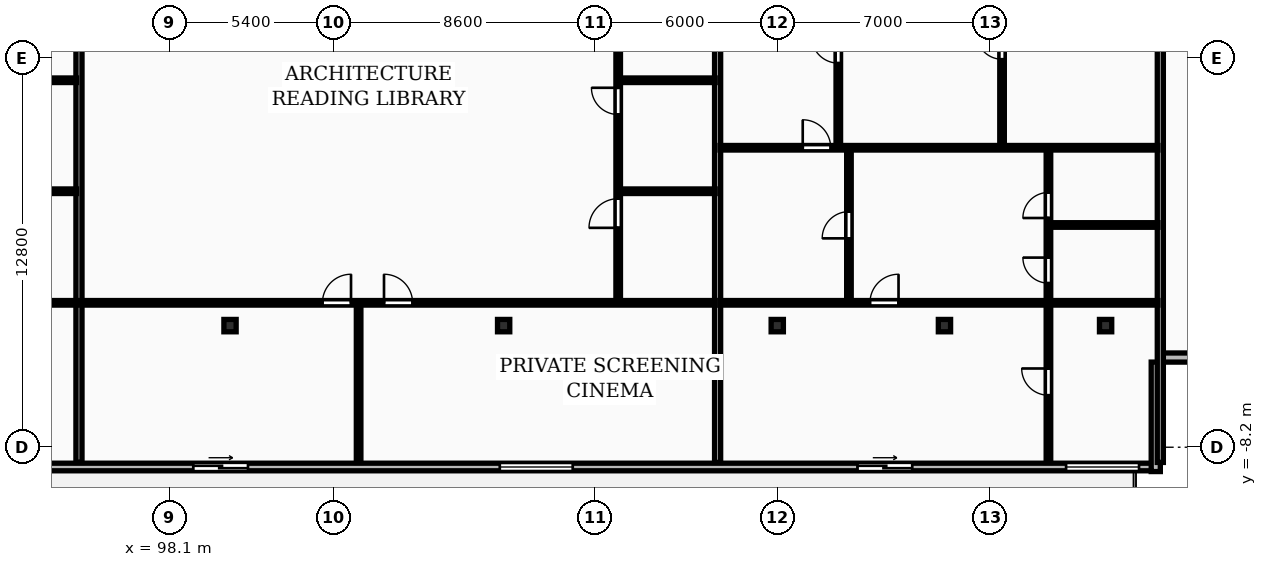
"""IFC4 building model, lengths in metres.
Left out: names, types, materials, properties, quantities, classifications, styles, units other than length and angle.
Written with IfcOpenShell. Run it as: python <this file> out.ifc"""

import sys

from ifc_helpers import new_model, si_unit, direction, frame, frame_2d, origin, origin_2d, place, context, subcontext, project, spatial, rectangle, i_section, extrude, element, fill, save


model = new_model("IFC4")
c1 = context("Model", 3, precision=1e-05, world=origin(), true_north=direction((0.0, 1.0)))
c2 = subcontext(c1, "Body", "Model", "MODEL_VIEW")
j1 = project(units=[si_unit("LENGTHUNIT", "METRE"), si_unit("PLANEANGLEUNIT", "RADIAN")], contexts=[c1])
p1 = place(None, origin())
s1 = spatial("IfcSite", under=j1, at=p1, CompositionType="ELEMENT")
p2 = place(p1, origin())
s2 = spatial("IfcBuilding", under=s1, at=p2, CompositionType="ELEMENT")
p3 = place(p2, frame((0.0, 0.0, 153.7)))
s3 = spatial("IfcBuildingStorey", under=s2, at=p3, CompositionType="ELEMENT", Elevation=153.7)
for number, where, z_axis, x_axis in (
    (1, (100.1, -4.2, 0.0), (0.0, 0.0, 1.0), (1.0, 0.0, 0.0)),
    (2, (109.1, -4.2, 0.0), (0.0, 0.0, 1.0), (1.0, 0.0, 0.0)),
    (3, (118.1, -4.2, 0.0), (0.0, 0.0, 1.0), (1.0, 0.0, 0.0)),
    (4, (123.6, -4.2, 0.0), (0.0, 0.0, 1.0), (1.0, 0.0, 0.0)),
    (5, (128.9, -4.2, 0.0), (0.0, 0.0, 1.0), (1.0, 0.0, 0.0)),
):
    element("IfcColumn", number, at=place(p3, frame(where, z_axis=z_axis, x_axis=x_axis)), inside=s3, PredefinedType="COLUMN", context=c2, shape_type="SweptSolid", body=[
        extrude(i_section(OverallWidth=0.403, OverallDepth=0.406, WebThickness=0.027, FlangeThickness=0.043, FilletRadius=0.015, at=origin_2d()), origin(), (0.0, 0.0, 1.0), 3.6),
    ])
p4 = place(p3, frame((72.7, -8.85, 0.0), z_axis=(0.0, 0.0, 1.0), x_axis=(1.0, 0.0, 0.0)))
e6 = element("IfcWall", 6, at=p4, inside=s3, PredefinedType="STANDARD", context=c2, shape_type="SweptSolid", body=[
    extrude(rectangle(XDim=58.0, YDim=0.25, at=frame_2d((29.0, 0.0))), origin(), (0.0, 0.0, 1.0), 3.32),
])
p5 = place(p4, frame((4.058, 0.0, 0.0)))
e7 = element("IfcOpeningElement", 7, at=p5, cuts=e6, PredefinedType="OPENING", context=c2, shape_type="SweptSolid", body=[
    extrude(rectangle(XDim=1.8, YDim=2.2, at=frame_2d((0.9, 1.1))), frame((0.0, 0.135, 0.0), z_axis=(0.0, -1.0, 0.0), x_axis=(1.0, 0.0, 0.0)), (0.0, 0.0, 1.0), 0.27),
])
p6 = place(p4, frame((14.854, 0.0, 0.85)))
e8 = element("IfcOpeningElement", 8, at=p6, cuts=e6, PredefinedType="OPENING", context=c2, shape_type="SweptSolid", body=[
    extrude(rectangle(XDim=2.4, YDim=1.9, at=frame_2d((1.2, 0.95))), frame((0.0, 0.135, 0.0), z_axis=(0.0, -1.0, 0.0), x_axis=(1.0, 0.0, 0.0)), (0.0, 0.0, 1.0), 0.27),
])
p7 = place(p4, frame((26.191, 0.0, 0.0)))
e9 = element("IfcOpeningElement", 9, at=p7, cuts=e6, PredefinedType="OPENING", context=c2, shape_type="SweptSolid", body=[
    extrude(rectangle(XDim=1.8, YDim=2.2, at=frame_2d((0.9, 1.1))), frame((0.0, 0.135, 0.0), z_axis=(0.0, -1.0, 0.0), x_axis=(1.0, 0.0, 0.0)), (0.0, 0.0, 1.0), 0.27),
])
p8 = place(p4, frame((36.274, 0.0, 0.85)))
e10 = element("IfcOpeningElement", 10, at=p8, cuts=e6, PredefinedType="OPENING", context=c2, shape_type="SweptSolid", body=[
    extrude(rectangle(XDim=2.4, YDim=1.9, at=frame_2d((1.2, 0.95))), frame((0.0, 0.135, 0.0), z_axis=(0.0, -1.0, 0.0), x_axis=(1.0, 0.0, 0.0)), (0.0, 0.0, 1.0), 0.27),
])
p9 = place(p4, frame((48.039, 0.0, 0.0)))
e11 = element("IfcOpeningElement", 11, at=p9, cuts=e6, PredefinedType="OPENING", context=c2, shape_type="SweptSolid", body=[
    extrude(rectangle(XDim=1.8, YDim=2.2, at=frame_2d((0.9, 1.1))), frame((0.0, 0.135, 0.0), z_axis=(0.0, -1.0, 0.0), x_axis=(1.0, 0.0, 0.0)), (0.0, 0.0, 1.0), 0.27),
])
p10 = place(p4, frame((54.9, 0.0, 0.85)))
e12 = element("IfcOpeningElement", 12, at=p10, cuts=e6, PredefinedType="OPENING", context=c2, shape_type="SweptSolid", body=[
    extrude(rectangle(XDim=2.4, YDim=1.9, at=frame_2d((1.2, 0.95))), frame((0.0, 0.135, 0.0), z_axis=(0.0, -1.0, 0.0), x_axis=(1.0, 0.0, 0.0)), (0.0, 0.0, 1.0), 0.27),
])
for number, where, z_axis, x_axis in (
    (13, (130.55, -9.0, 0.0), (0.0, 0.0, 1.0), (0.0, 1.0, 0.0)),
    (14, (130.7, -5.25, 0.0), (0.0, 0.0, 1.0), (1.0, 0.0, 0.0)),
):
    element("IfcWall", number, at=place(p3, frame(where, z_axis=z_axis, x_axis=x_axis)), inside=s3, PredefinedType="STANDARD", context=c2, shape_type="SweptSolid", body=[
        extrude(rectangle(XDim=3.6, YDim=0.3, at=frame_2d((1.8, 0.0))), origin(), (0.0, 0.0, 1.0), 3.32),
    ])
for number, where, z_axis, x_axis in (
    (15, (130.7, -8.7, 0.0), (0.0, 0.0, 1.0), (0.0, 1.0, 0.0)),
    (16, (95.132, -8.7, 0.0), (0.0, 0.0, 1.0), (0.0, 1.0, 0.0)),
):
    element("IfcWall", number, at=place(p3, frame(where, z_axis=z_axis, x_axis=x_axis)), inside=s3, PredefinedType="PARTITIONING", context=c2, shape_type="SweptSolid", body=[
        extrude(rectangle(XDim=24.57, YDim=0.2, at=frame_2d((12.285, 0.0))), origin(), (0.0, 0.0, 1.0), 3.32),
    ])
for number, where, z_axis, x_axis in (
    (17, (91.691, 0.22, 0.0), (0.0, 0.0, 1.0), (1.0, 0.0, 0.0)),
    (18, (91.691, 3.87, 0.0), (0.0, 0.0, 1.0), (1.0, 0.0, 0.0)),
):
    element("IfcWall", number, at=place(p3, frame(where, z_axis=z_axis, x_axis=x_axis)), inside=s3, PredefinedType="PARTITIONING", context=c2, shape_type="SweptSolid", body=[
        extrude(rectangle(XDim=3.36, YDim=0.15, at=frame_2d((1.68, 0.0))), origin(), (0.0, 0.0, 1.0), 3.32),
    ])
p11 = place(p3, frame((72.78, -3.45, 0.0), z_axis=(0.0, 0.0, 1.0), x_axis=(1.0, 0.0, 0.0)))
e19 = element("IfcWall", 19, at=p11, inside=s3, PredefinedType="PARTITIONING", context=c2, shape_type="SweptSolid", body=[
    extrude(rectangle(XDim=22.271, YDim=0.15, at=frame_2d((11.136, 0.0))), origin(), (0.0, 0.0, 1.0), 3.32),
])
p12 = place(p11, frame((6.871, 0.0, 0.0)))
e20 = element("IfcOpeningElement", 20, at=p12, cuts=e19, PredefinedType="OPENING", context=c2, shape_type="SweptSolid", body=[
    extrude(rectangle(XDim=0.94, YDim=2.1, at=frame_2d((0.47, 1.05))), frame((0.0, 0.085, 0.0), z_axis=(0.0, -1.0, 0.0), x_axis=(1.0, 0.0, 0.0)), (0.0, 0.0, 1.0), 0.17),
])
p13 = place(p11, frame((10.735, 0.0, 0.0)))
e21 = element("IfcOpeningElement", 21, at=p13, cuts=e19, PredefinedType="OPENING", context=c2, shape_type="SweptSolid", body=[
    extrude(rectangle(XDim=0.94, YDim=2.1, at=frame_2d((0.47, 1.05))), frame((0.0, 0.085, 0.0), z_axis=(0.0, -1.0, 0.0), x_axis=(1.0, 0.0, 0.0)), (0.0, 0.0, 1.0), 0.17),
])
p14 = place(p3, frame((116.138, -8.7, 0.0), z_axis=(0.0, 0.0, 1.0), x_axis=(0.0, 1.0, 0.0)))
e22 = element("IfcWall", 22, at=p14, inside=s3, PredefinedType="PARTITIONING", context=c2, shape_type="SweptSolid", body=[
    extrude(rectangle(XDim=24.57, YDim=0.2, at=frame_2d((12.285, 0.0))), origin(), (0.0, 0.0, 1.0), 3.32),
])
for number, where, z_axis, x_axis in (
    (23, (112.928, 0.22, 0.0), (0.0, 0.0, 1.0), (1.0, 0.0, 0.0)),
    (24, (112.928, 3.87, 0.0), (0.0, 0.0, 1.0), (1.0, 0.0, 0.0)),
):
    element("IfcWall", number, at=place(p3, frame(where, z_axis=z_axis, x_axis=x_axis)), inside=s3, PredefinedType="PARTITIONING", context=c2, shape_type="SweptSolid", body=[
        extrude(rectangle(XDim=3.13, YDim=0.15, at=frame_2d((1.565, 0.0))), origin(), (0.0, 0.0, 1.0), 3.32),
    ])
p15 = place(p3, frame((112.868, -3.39, 0.0), z_axis=(0.0, 0.0, 1.0), x_axis=(0.0, 1.0, 0.0)))
e25 = element("IfcWall", 25, at=p15, inside=s3, PredefinedType="PARTITIONING", context=c2, shape_type="SweptSolid", body=[
    extrude(rectangle(XDim=19.28, YDim=0.15, at=frame_2d((9.64, 0.0))), origin(), (0.0, 0.0, 1.0), 3.32),
])
p16 = place(p15, frame((2.406, 0.0, 0.0)))
e26 = element("IfcOpeningElement", 26, at=p16, cuts=e25, PredefinedType="OPENING", context=c2, shape_type="SweptSolid", body=[
    extrude(rectangle(XDim=0.96, YDim=2.1, at=frame_2d((0.48, 1.05))), frame((0.0, 0.085, 0.0), z_axis=(0.0, -1.0, 0.0), x_axis=(1.0, 0.0, 0.0)), (0.0, 0.0, 1.0), 0.17),
])
p17 = place(p15, frame((6.133, 0.0, 0.0)))
e27 = element("IfcOpeningElement", 27, at=p17, cuts=e25, PredefinedType="OPENING", context=c2, shape_type="SweptSolid", body=[
    extrude(rectangle(XDim=0.88, YDim=2.06, at=frame_2d((0.44, 1.03))), frame((0.0, 0.085, 0.0), z_axis=(0.0, -1.0, 0.0), x_axis=(1.0, 0.0, 0.0)), (0.0, 0.0, 1.0), 0.17),
])
p18 = place(p15, frame((9.22, 0.0, 0.0)))
e28 = element("IfcOpeningElement", 28, at=p18, cuts=e25, PredefinedType="OPENING", context=c2, shape_type="SweptSolid", body=[
    extrude(rectangle(XDim=0.84, YDim=2.04, at=frame_2d((0.42, 1.02))), frame((0.0, 0.085, 0.0), z_axis=(0.0, -1.0, 0.0), x_axis=(1.0, 0.0, 0.0)), (0.0, 0.0, 1.0), 0.17),
])
p19 = place(p3, frame((104.33, -8.7, 0.0), z_axis=(0.0, 0.0, 1.0), x_axis=(0.0, 1.0, 0.0)))
e29 = element("IfcWall", 29, at=p19, inside=s3, PredefinedType="PARTITIONING", context=c2, shape_type="SweptSolid", body=[
    extrude(rectangle(XDim=5.17, YDim=0.15, at=frame_2d((2.585, 0.0))), origin(), (0.0, 0.0, 1.0), 3.32),
])
p20 = place(p3, frame((95.211, -3.45, 0.0), z_axis=(0.0, 0.0, 1.0), x_axis=(1.0, 0.0, 0.0)))
e30 = element("IfcWall", 30, at=p20, inside=s3, PredefinedType="PARTITIONING", context=c2, shape_type="SweptSolid", body=[
    extrude(rectangle(XDim=20.847, YDim=0.15, at=frame_2d((10.423, 0.0))), origin(), (0.0, 0.0, 1.0), 3.32),
])
p21 = place(p20, frame((7.928, 0.0, 0.0)))
e31 = element("IfcOpeningElement", 31, at=p21, cuts=e30, PredefinedType="OPENING", context=c2, shape_type="SweptSolid", body=[
    extrude(rectangle(XDim=0.94, YDim=2.1, at=frame_2d((0.47, 1.05))), frame((0.0, 0.085, 0.0), z_axis=(0.0, -1.0, 0.0), x_axis=(1.0, 0.0, 0.0)), (0.0, 0.0, 1.0), 0.17),
])
p22 = place(p20, frame((9.953, 0.0, 0.0)))
e32 = element("IfcOpeningElement", 32, at=p22, cuts=e30, PredefinedType="OPENING", context=c2, shape_type="SweptSolid", body=[
    extrude(rectangle(XDim=0.94, YDim=2.1, at=frame_2d((0.47, 1.05))), frame((0.0, 0.085, 0.0), z_axis=(0.0, -1.0, 0.0), x_axis=(1.0, 0.0, 0.0)), (0.0, 0.0, 1.0), 0.17),
])
p23 = place(p3, frame((125.494, 1.69, 0.0), z_axis=(0.0, 0.0, 1.0), x_axis=(0.0, 1.0, 0.0)))
e33 = element("IfcWall", 33, at=p23, inside=s3, PredefinedType="PARTITIONING", context=c2, shape_type="SweptSolid", body=[
    extrude(rectangle(XDim=6.92, YDim=0.15, at=frame_2d((3.46, 0.0))), origin(), (0.0, 0.0, 1.0), 3.32),
])
p24 = place(p23, frame((2.871, 0.0, 0.0)))
e34 = element("IfcOpeningElement", 34, at=p24, cuts=e33, PredefinedType="OPENING", context=c2, shape_type="SweptSolid", body=[
    extrude(rectangle(XDim=0.84, YDim=2.04, at=frame_2d((0.42, 1.02))), frame((0.0, 0.085, 0.0), z_axis=(0.0, -1.0, 0.0), x_axis=(1.0, 0.0, 0.0)), (0.0, 0.0, 1.0), 0.17),
])
p25 = place(p3, frame((120.108, 1.69, 0.0), z_axis=(0.0, 0.0, 1.0), x_axis=(0.0, 1.0, 0.0)))
e35 = element("IfcWall", 35, at=p25, inside=s3, PredefinedType="PARTITIONING", context=c2, shape_type="SweptSolid", body=[
    extrude(rectangle(XDim=14.2, YDim=0.15, at=frame_2d((7.1, 0.0))), origin(), (0.0, 0.0, 1.0), 3.32),
])
p26 = place(p25, frame((2.744, 0.0, 0.0)))
e36 = element("IfcOpeningElement", 36, at=p26, cuts=e35, PredefinedType="OPENING", context=c2, shape_type="SweptSolid", body=[
    extrude(rectangle(XDim=0.88, YDim=2.06, at=frame_2d((0.44, 1.03))), frame((0.0, 0.085, 0.0), z_axis=(0.0, -1.0, 0.0), x_axis=(1.0, 0.0, 0.0)), (0.0, 0.0, 1.0), 0.17),
])
p27 = place(p3, frame((120.458, -3.39, 0.0), z_axis=(0.0, 0.0, 1.0), x_axis=(0.0, 1.0, 0.0)))
e37 = element("IfcWall", 37, at=p27, inside=s3, PredefinedType="PARTITIONING", context=c2, shape_type="SweptSolid", body=[
    extrude(rectangle(XDim=5.0, YDim=0.15, at=frame_2d((2.5, 0.0))), origin(), (0.0, 0.0, 1.0), 3.32),
])
p28 = place(p27, frame((2.06, 0.0, 0.0)))
e38 = element("IfcOpeningElement", 38, at=p28, cuts=e37, PredefinedType="OPENING", context=c2, shape_type="SweptSolid", body=[
    extrude(rectangle(XDim=0.88, YDim=2.06, at=frame_2d((0.44, 1.03))), frame((0.0, 0.085, 0.0), z_axis=(0.0, -1.0, 0.0), x_axis=(1.0, 0.0, 0.0)), (0.0, 0.0, 1.0), 0.17),
])
p29 = place(p3, frame((127.08, -0.89, 0.0), z_axis=(0.0, 0.0, 1.0), x_axis=(1.0, 0.0, 0.0)))
e39 = element("IfcWall", 39, at=p29, inside=s3, PredefinedType="PARTITIONING", context=c2, shape_type="SweptSolid", body=[
    extrude(rectangle(XDim=3.54, YDim=0.15, at=frame_2d((1.77, 0.0))), origin(), (0.0, 0.0, 1.0), 3.32),
])
p30 = place(p3, frame((127.02, -8.7, 0.0), z_axis=(0.0, 0.0, 1.0), x_axis=(0.0, 1.0, 0.0)))
e40 = element("IfcWall", 40, at=p30, inside=s3, PredefinedType="PARTITIONING", context=c2, shape_type="SweptSolid", body=[
    extrude(rectangle(XDim=10.31, YDim=0.15, at=frame_2d((5.155, 0.0))), origin(), (0.0, 0.0, 1.0), 3.32),
])
p31 = place(p30, frame((5.897, 0.0, 0.0)))
e41 = element("IfcOpeningElement", 41, at=p31, cuts=e40, PredefinedType="OPENING", context=c2, shape_type="SweptSolid", body=[
    extrude(rectangle(XDim=0.84, YDim=2.04, at=frame_2d((0.42, 1.02))), frame((0.0, 0.085, 0.0), z_axis=(0.0, -1.0, 0.0), x_axis=(1.0, 0.0, 0.0)), (0.0, 0.0, 1.0), 0.17),
])
p32 = place(p30, frame((8.04, 0.0, 0.0)))
e42 = element("IfcOpeningElement", 42, at=p32, cuts=e40, PredefinedType="OPENING", context=c2, shape_type="SweptSolid", body=[
    extrude(rectangle(XDim=0.84, YDim=2.04, at=frame_2d((0.42, 1.02))), frame((0.0, 0.085, 0.0), z_axis=(0.0, -1.0, 0.0), x_axis=(1.0, 0.0, 0.0)), (0.0, 0.0, 1.0), 0.17),
])
p33 = place(p30, frame((2.21, 0.0, 0.0)))
e43 = element("IfcOpeningElement", 43, at=p33, cuts=e40, PredefinedType="OPENING", context=c2, shape_type="SweptSolid", body=[
    extrude(rectangle(XDim=0.88, YDim=2.06, at=frame_2d((0.44, 1.03))), frame((0.0, 0.085, 0.0), z_axis=(0.0, -1.0, 0.0), x_axis=(1.0, 0.0, 0.0)), (0.0, 0.0, 1.0), 0.17),
])
p34 = place(p3, frame((116.218, 1.65, 0.0), z_axis=(0.0, 0.0, 1.0), x_axis=(1.0, 0.0, 0.0)))
e44 = element("IfcWall", 44, at=p34, inside=s3, PredefinedType="PARTITIONING", context=c2, shape_type="SweptSolid", body=[
    extrude(rectangle(XDim=14.402, YDim=0.15, at=frame_2d((7.201, 0.0))), origin(), (0.0, 0.0, 1.0), 3.32),
])
p35 = place(p34, frame((2.72, 0.0, 0.0)))
e45 = element("IfcOpeningElement", 45, at=p35, cuts=e44, PredefinedType="OPENING", context=c2, shape_type="SweptSolid", body=[
    extrude(rectangle(XDim=0.92, YDim=2.08, at=frame_2d((0.46, 1.04))), frame((0.0, 0.085, 0.0), z_axis=(0.0, -1.0, 0.0), x_axis=(1.0, 0.0, 0.0)), (0.0, 0.0, 1.0), 0.17),
])
p36 = place(p3, frame((116.218, -3.45, 0.0), z_axis=(0.0, 0.0, 1.0), x_axis=(1.0, 0.0, 0.0)))
e46 = element("IfcWall", 46, at=p36, inside=s3, PredefinedType="PARTITIONING", context=c2, shape_type="SweptSolid", body=[
    extrude(rectangle(XDim=14.402, YDim=0.15, at=frame_2d((7.201, 0.0))), origin(), (0.0, 0.0, 1.0), 3.32),
])
p37 = place(p36, frame((4.931, 0.0, 0.0)))
e47 = element("IfcOpeningElement", 47, at=p37, cuts=e46, PredefinedType="OPENING", context=c2, shape_type="SweptSolid", body=[
    extrude(rectangle(XDim=0.94, YDim=2.1, at=frame_2d((0.47, 1.05))), frame((0.0, 0.085, 0.0), z_axis=(0.0, -1.0, 0.0), x_axis=(1.0, 0.0, 0.0)), (0.0, 0.0, 1.0), 0.17),
])
p38 = place(p7, origin())
e48 = element("IfcDoor", 48, at=p38, inside=s3, OperationType="SLIDING_TO_RIGHT", PredefinedType="DOOR", context=c2, shape_type="SweptSolid", body=[
    extrude(rectangle(XDim=1.8, YDim=2.2, at=frame_2d((0.9, 1.1))), frame((0.0, 0.025, 0.0), z_axis=(0.0, -1.0, 0.0), x_axis=(1.0, 0.0, 0.0)), (0.0, 0.0, 1.0), 0.05),
])
fill(e9, e48)
p39 = place(p8, origin())
e49 = element("IfcWindow", 49, at=p39, inside=s3, PartitioningType="DOUBLE_PANEL_VERTICAL", PredefinedType="WINDOW", context=c2, shape_type="SweptSolid", body=[
    extrude(rectangle(XDim=2.4, YDim=1.9, at=frame_2d((1.2, 0.95))), frame((0.0, 0.03, 0.0), z_axis=(0.0, -1.0, 0.0), x_axis=(1.0, 0.0, 0.0)), (0.0, 0.0, 1.0), 0.06),
])
fill(e10, e49)
p40 = place(p9, origin())
e50 = element("IfcDoor", 50, at=p40, inside=s3, OperationType="SLIDING_TO_RIGHT", PredefinedType="DOOR", context=c2, shape_type="SweptSolid", body=[
    extrude(rectangle(XDim=1.8, YDim=2.2, at=frame_2d((0.9, 1.1))), frame((0.0, 0.025, 0.0), z_axis=(0.0, -1.0, 0.0), x_axis=(1.0, 0.0, 0.0)), (0.0, 0.0, 1.0), 0.05),
])
fill(e11, e50)
p41 = place(p10, origin())
e51 = element("IfcWindow", 51, at=p41, inside=s3, PartitioningType="DOUBLE_PANEL_VERTICAL", PredefinedType="WINDOW", context=c2, shape_type="SweptSolid", body=[
    extrude(rectangle(XDim=2.4, YDim=1.9, at=frame_2d((1.2, 0.95))), frame((0.0, 0.03, 0.0), z_axis=(0.0, -1.0, 0.0), x_axis=(1.0, 0.0, 0.0)), (0.0, 0.0, 1.0), 0.06),
])
fill(e12, e51)
p42 = place(p16, origin())
e52 = element("IfcDoor", 52, at=p42, inside=s3, OperationType="SINGLE_SWING_LEFT", PredefinedType="DOOR", context=c2, shape_type="SweptSolid", body=[
    extrude(rectangle(XDim=0.96, YDim=2.1, at=frame_2d((0.48, 1.05))), frame((0.0, 0.025, 0.0), z_axis=(0.0, -1.0, 0.0), x_axis=(1.0, 0.0, 0.0)), (0.0, 0.0, 1.0), 0.05),
])
fill(e26, e52)
p43 = place(p17, origin())
e53 = element("IfcDoor", 53, at=p43, inside=s3, OperationType="SINGLE_SWING_RIGHT", PredefinedType="DOOR", context=c2, shape_type="SweptSolid", body=[
    extrude(rectangle(XDim=0.88, YDim=2.06, at=frame_2d((0.44, 1.03))), frame((0.0, 0.025, 0.0), z_axis=(0.0, -1.0, 0.0), x_axis=(1.0, 0.0, 0.0)), (0.0, 0.0, 1.0), 0.05),
])
fill(e27, e53)
p44 = place(p21, origin())
e54 = element("IfcDoor", 54, at=p44, inside=s3, OperationType="SINGLE_SWING_RIGHT", PredefinedType="DOOR", context=c2, shape_type="SweptSolid", body=[
    extrude(rectangle(XDim=0.94, YDim=2.1, at=frame_2d((0.47, 1.05))), frame((0.0, 0.025, 0.0), z_axis=(0.0, -1.0, 0.0), x_axis=(1.0, 0.0, 0.0)), (0.0, 0.0, 1.0), 0.05),
])
fill(e31, e54)
p45 = place(p22, origin())
e55 = element("IfcDoor", 55, at=p45, inside=s3, OperationType="SINGLE_SWING_LEFT", PredefinedType="DOOR", context=c2, shape_type="SweptSolid", body=[
    extrude(rectangle(XDim=0.94, YDim=2.1, at=frame_2d((0.47, 1.05))), frame((0.0, 0.025, 0.0), z_axis=(0.0, -1.0, 0.0), x_axis=(1.0, 0.0, 0.0)), (0.0, 0.0, 1.0), 0.05),
])
fill(e32, e55)
p46 = place(p24, origin())
e56 = element("IfcDoor", 56, at=p46, inside=s3, OperationType="SINGLE_SWING_RIGHT", PredefinedType="DOOR", context=c2, shape_type="SweptSolid", body=[
    extrude(rectangle(XDim=0.84, YDim=2.04, at=frame_2d((0.42, 1.02))), frame((0.0, 0.025, 0.0), z_axis=(0.0, -1.0, 0.0), x_axis=(1.0, 0.0, 0.0)), (0.0, 0.0, 1.0), 0.05),
])
fill(e34, e56)
p47 = place(p26, origin())
e57 = element("IfcDoor", 57, at=p47, inside=s3, OperationType="SINGLE_SWING_RIGHT", PredefinedType="DOOR", context=c2, shape_type="SweptSolid", body=[
    extrude(rectangle(XDim=0.88, YDim=2.06, at=frame_2d((0.44, 1.03))), frame((0.0, 0.025, 0.0), z_axis=(0.0, -1.0, 0.0), x_axis=(1.0, 0.0, 0.0)), (0.0, 0.0, 1.0), 0.05),
])
fill(e36, e57)
p48 = place(p28, origin())
e58 = element("IfcDoor", 58, at=p48, inside=s3, OperationType="SINGLE_SWING_LEFT", PredefinedType="DOOR", context=c2, shape_type="SweptSolid", body=[
    extrude(rectangle(XDim=0.88, YDim=2.06, at=frame_2d((0.44, 1.03))), frame((0.0, 0.025, 0.0), z_axis=(0.0, -1.0, 0.0), x_axis=(1.0, 0.0, 0.0)), (0.0, 0.0, 1.0), 0.05),
])
fill(e38, e58)
p49 = place(p31, origin())
e59 = element("IfcDoor", 59, at=p49, inside=s3, OperationType="SINGLE_SWING_RIGHT", PredefinedType="DOOR", context=c2, shape_type="SweptSolid", body=[
    extrude(rectangle(XDim=0.84, YDim=2.04, at=frame_2d((0.42, 1.02))), frame((0.0, 0.025, 0.0), z_axis=(0.0, -1.0, 0.0), x_axis=(1.0, 0.0, 0.0)), (0.0, 0.0, 1.0), 0.05),
])
fill(e41, e59)
p50 = place(p32, origin())
e60 = element("IfcDoor", 60, at=p50, inside=s3, OperationType="SINGLE_SWING_LEFT", PredefinedType="DOOR", context=c2, shape_type="SweptSolid", body=[
    extrude(rectangle(XDim=0.84, YDim=2.04, at=frame_2d((0.42, 1.02))), frame((0.0, 0.025, 0.0), z_axis=(0.0, -1.0, 0.0), x_axis=(1.0, 0.0, 0.0)), (0.0, 0.0, 1.0), 0.05),
])
fill(e42, e60)
p51 = place(p33, origin())
e61 = element("IfcDoor", 61, at=p51, inside=s3, OperationType="SINGLE_SWING_RIGHT", PredefinedType="DOOR", context=c2, shape_type="SweptSolid", body=[
    extrude(rectangle(XDim=0.88, YDim=2.06, at=frame_2d((0.44, 1.03))), frame((0.0, 0.025, 0.0), z_axis=(0.0, -1.0, 0.0), x_axis=(1.0, 0.0, 0.0)), (0.0, 0.0, 1.0), 0.05),
])
fill(e43, e61)
p52 = place(p35, origin())
e62 = element("IfcDoor", 62, at=p52, inside=s3, OperationType="SINGLE_SWING_LEFT", PredefinedType="DOOR", context=c2, shape_type="SweptSolid", body=[
    extrude(rectangle(XDim=0.92, YDim=2.08, at=frame_2d((0.46, 1.04))), frame((0.0, 0.025, 0.0), z_axis=(0.0, -1.0, 0.0), x_axis=(1.0, 0.0, 0.0)), (0.0, 0.0, 1.0), 0.05),
])
fill(e45, e62)
p53 = place(p37, origin())
e63 = element("IfcDoor", 63, at=p53, inside=s3, OperationType="SINGLE_SWING_RIGHT", PredefinedType="DOOR", context=c2, shape_type="SweptSolid", body=[
    extrude(rectangle(XDim=0.94, YDim=2.1, at=frame_2d((0.47, 1.05))), frame((0.0, 0.025, 0.0), z_axis=(0.0, -1.0, 0.0), x_axis=(1.0, 0.0, 0.0)), (0.0, 0.0, 1.0), 0.05),
])
fill(e47, e63)
save(model, sys.argv[1])
